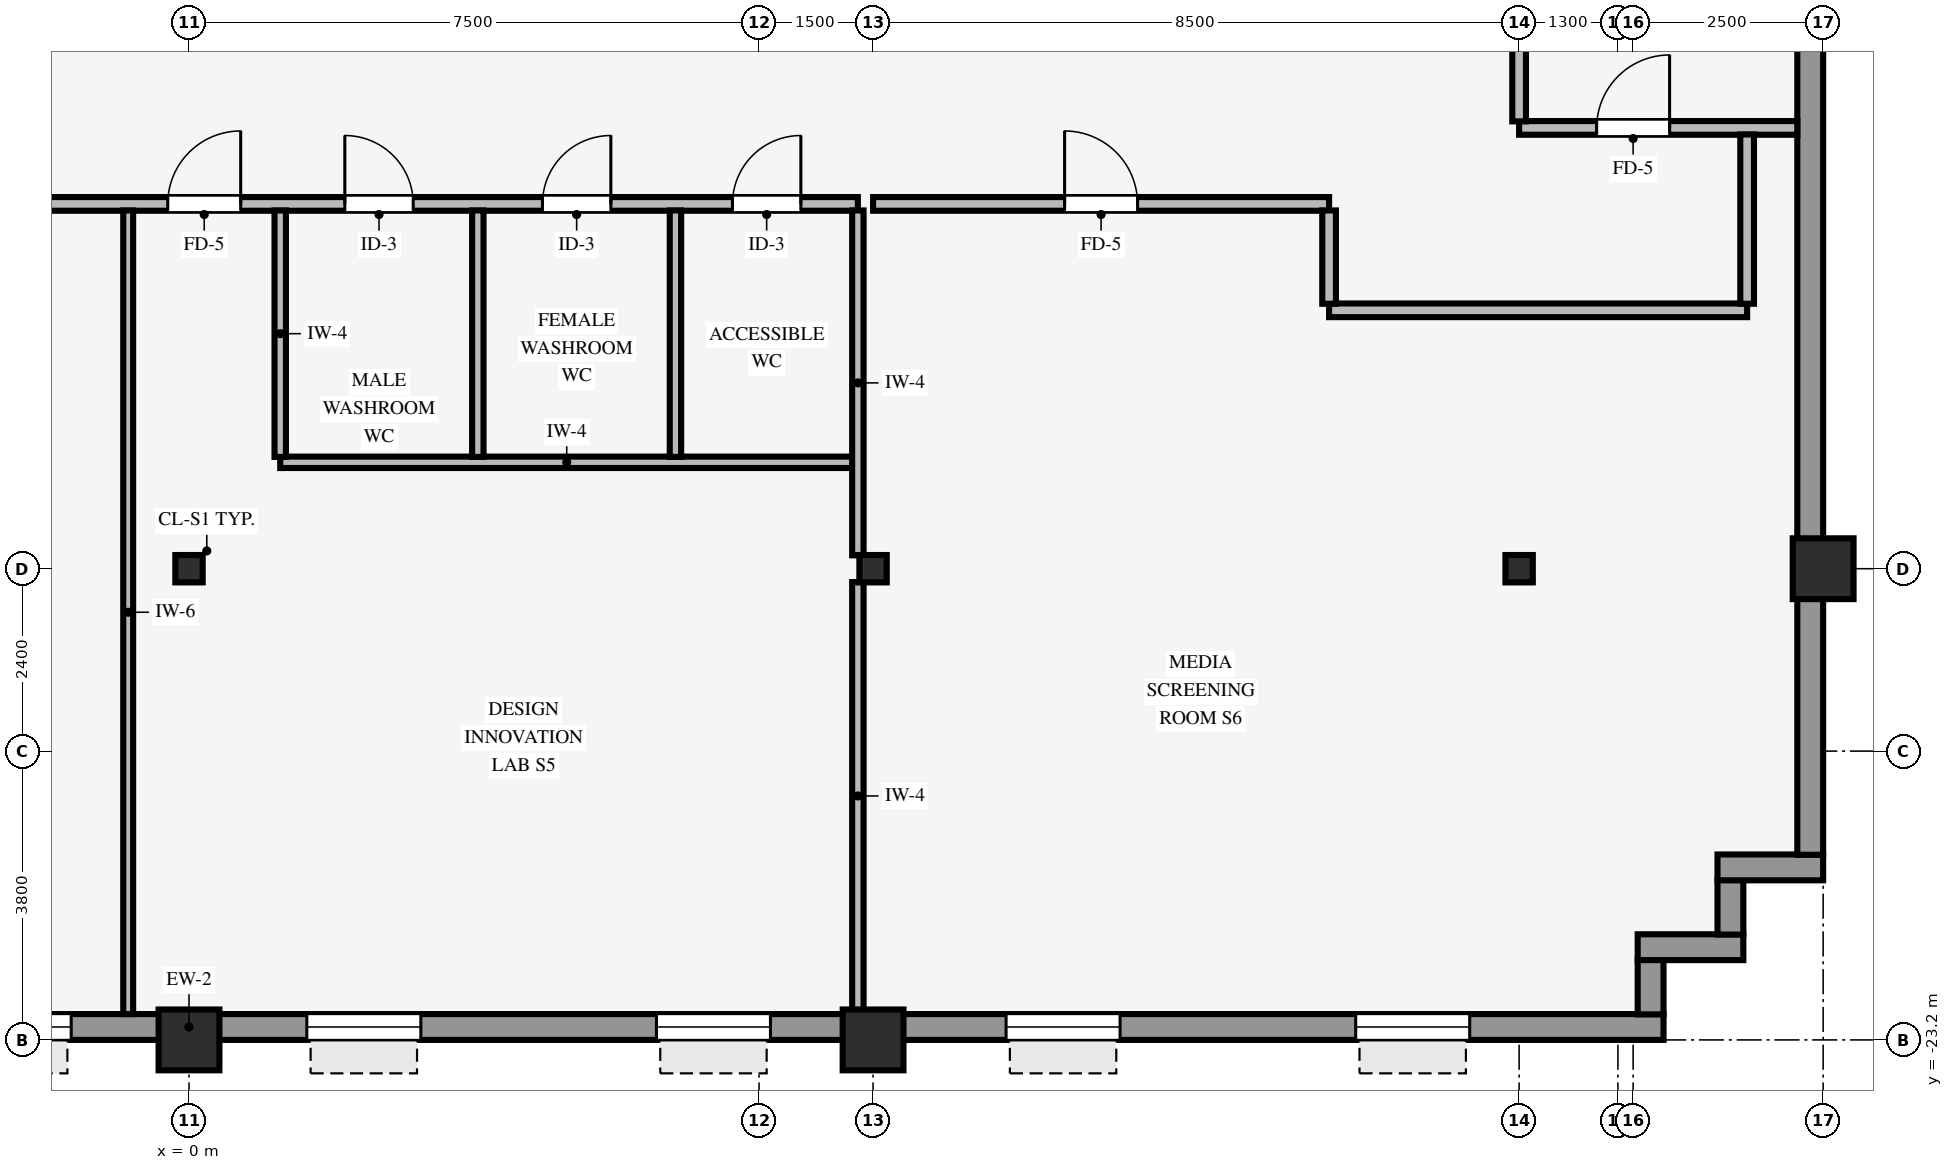
"""IFC4 building model, lengths in metres.
Left out: names, types, materials, properties, quantities, classifications, styles, units other than length and angle.
Written with IfcOpenShell. Run it as: python <this file> out.ifc"""

import sys

from ifc_helpers import new_model, si_unit, direction, frame, frame_2d, origin, origin_2d, place, context, subcontext, project, spatial, rectangle, hollow_rectangle, i_section, extrude, source, transform, mapped, element, fill, save


model = new_model("IFC4")
c1 = context("Model", 3, precision=1e-05, world=origin(), true_north=direction((0.0, 1.0)))
c2 = subcontext(c1, "Body", "Model", "MODEL_VIEW")
j1 = project(units=[si_unit("LENGTHUNIT", "METRE"), si_unit("PLANEANGLEUNIT", "RADIAN")], contexts=[c1])
p1 = place(None, origin())
s1 = spatial("IfcSite", under=j1, at=p1, CompositionType="ELEMENT")
p2 = place(p1, origin())
s2 = spatial("IfcBuilding", under=s1, at=p2, CompositionType="ELEMENT")
p3 = place(p2, frame((0.0, 0.0, 64.1)))
s3 = spatial("IfcBuildingStorey", under=s2, at=p3, CompositionType="ELEMENT", Elevation=64.1)
for number, where, z_axis, x_axis in (
    (1, (21.5, -17.0, 0.0), (0.0, 0.0, 1.0), (1.0, 0.0, 0.0)),
    (2, (0.0, -23.2, 0.0), (0.0, 0.0, 1.0), (1.0, 0.0, 0.0)),
    (3, (9.0, -23.2, 0.0), (0.0, 0.0, 1.0), (1.0, 0.0, 0.0)),
):
    element("IfcColumn", number, at=place(p3, frame(where, z_axis=z_axis, x_axis=x_axis)), inside=s3, PredefinedType="COLUMN", context=c2, shape_type="SweptSolid", body=[
        extrude(hollow_rectangle(XDim=0.8, YDim=0.8, WallThickness=0.055, InnerFilletRadius=0.055, OuterFilletRadius=0.11, at=origin_2d()), origin(), (0.0, 0.0, 1.0), 3.37),
    ])
for number, where, z_axis, x_axis in (
    (4, (0.0, -17.0, 0.0), (0.0, 0.0, 1.0), (1.0, 0.0, 0.0)),
    (5, (9.0, -17.0, 0.0), (0.0, 0.0, 1.0), (1.0, 0.0, 0.0)),
    (6, (17.5, -17.0, 0.0), (0.0, 0.0, 1.0), (1.0, 0.0, 0.0)),
):
    element("IfcColumn", number, at=place(p3, frame(where, z_axis=z_axis, x_axis=x_axis)), inside=s3, PredefinedType="COLUMN", context=c2, shape_type="SweptSolid", body=[
        extrude(i_section(OverallWidth=0.36, OverallDepth=0.36, WebThickness=0.021, FlangeThickness=0.021, FilletRadius=0.018, at=origin_2d()), origin(), (0.0, 0.0, 1.0), 3.37),
    ])
p4 = place(p3, frame((-19.4, -23.03, 0.0), z_axis=(0.0, 0.0, 1.0), x_axis=(1.0, 0.0, 0.0)))
e7 = element("IfcWall", 7, at=p4, inside=s3, PredefinedType="STANDARD", context=c2, shape_type="SweptSolid", body=[
    extrude(rectangle(XDim=38.8, YDim=0.34, at=frame_2d((19.4, 0.0))), origin(), (0.0, 0.0, 1.0), 2.705),
])
p5 = place(p4, frame((2.55, 0.0, 0.8)))
e8 = element("IfcOpeningElement", 8, at=p5, cuts=e7, PredefinedType="OPENING", context=c2, shape_type="SweptSolid", body=[
    extrude(rectangle(XDim=1.5, YDim=1.6, at=frame_2d((0.75, 0.8))), frame((0.0, 0.18, 0.0), z_axis=(0.0, -1.0, 0.0), x_axis=(1.0, 0.0, 0.0)), (0.0, 0.0, 1.0), 0.36),
])
p6 = place(p4, frame((6.25, 0.0, 0.8)))
e9 = element("IfcOpeningElement", 9, at=p6, cuts=e7, PredefinedType="OPENING", context=c2, shape_type="SweptSolid", body=[
    extrude(rectangle(XDim=1.5, YDim=1.6, at=frame_2d((0.75, 0.8))), frame((0.0, 0.18, 0.0), z_axis=(0.0, -1.0, 0.0), x_axis=(1.0, 0.0, 0.0)), (0.0, 0.0, 1.0), 0.36),
])
p7 = place(p4, frame((12.65, 0.0, 0.8)))
e10 = element("IfcOpeningElement", 10, at=p7, cuts=e7, PredefinedType="OPENING", context=c2, shape_type="SweptSolid", body=[
    extrude(rectangle(XDim=1.5, YDim=1.6, at=frame_2d((0.75, 0.8))), frame((0.0, 0.18, 0.0), z_axis=(0.0, -1.0, 0.0), x_axis=(1.0, 0.0, 0.0)), (0.0, 0.0, 1.0), 0.36),
])
p8 = place(p4, frame((16.35, 0.0, 0.8)))
e11 = element("IfcOpeningElement", 11, at=p8, cuts=e7, PredefinedType="OPENING", context=c2, shape_type="SweptSolid", body=[
    extrude(rectangle(XDim=1.5, YDim=1.6, at=frame_2d((0.75, 0.8))), frame((0.0, 0.18, 0.0), z_axis=(0.0, -1.0, 0.0), x_axis=(1.0, 0.0, 0.0)), (0.0, 0.0, 1.0), 0.36),
])
p9 = place(p4, frame((20.95, 0.0, 0.8)))
e12 = element("IfcOpeningElement", 12, at=p9, cuts=e7, PredefinedType="OPENING", context=c2, shape_type="SweptSolid", body=[
    extrude(rectangle(XDim=1.5, YDim=1.6, at=frame_2d((0.75, 0.8))), frame((0.0, 0.18, 0.0), z_axis=(0.0, -1.0, 0.0), x_axis=(1.0, 0.0, 0.0)), (0.0, 0.0, 1.0), 0.36),
])
p10 = place(p4, frame((25.55, 0.0, 0.8)))
e13 = element("IfcOpeningElement", 13, at=p10, cuts=e7, PredefinedType="OPENING", context=c2, shape_type="SweptSolid", body=[
    extrude(rectangle(XDim=1.5, YDim=1.6, at=frame_2d((0.75, 0.8))), frame((0.0, 0.18, 0.0), z_axis=(0.0, -1.0, 0.0), x_axis=(1.0, 0.0, 0.0)), (0.0, 0.0, 1.0), 0.36),
])
p11 = place(p4, frame((30.15, 0.0, 0.8)))
e14 = element("IfcOpeningElement", 14, at=p11, cuts=e7, PredefinedType="OPENING", context=c2, shape_type="SweptSolid", body=[
    extrude(rectangle(XDim=1.5, YDim=1.6, at=frame_2d((0.75, 0.8))), frame((0.0, 0.18, 0.0), z_axis=(0.0, -1.0, 0.0), x_axis=(1.0, 0.0, 0.0)), (0.0, 0.0, 1.0), 0.36),
])
p12 = place(p4, frame((34.75, 0.0, 0.8)))
e15 = element("IfcOpeningElement", 15, at=p12, cuts=e7, PredefinedType="OPENING", context=c2, shape_type="SweptSolid", body=[
    extrude(rectangle(XDim=1.5, YDim=1.6, at=frame_2d((0.75, 0.8))), frame((0.0, 0.18, 0.0), z_axis=(0.0, -1.0, 0.0), x_axis=(1.0, 0.0, 0.0)), (0.0, 0.0, 1.0), 0.36),
])
p13 = place(p3, frame((19.23, -22.864, 0.0), z_axis=(0.0, 0.0, 1.0), x_axis=(0.0, 1.0, 0.0)))
e16 = element("IfcWall", 16, at=p13, inside=s3, PredefinedType="STANDARD", context=c2, shape_type="SweptSolid", body=[
    extrude(rectangle(XDim=0.718, YDim=0.34, at=frame_2d((0.359, 0.0))), origin(), (0.0, 0.0, 1.0), 3.36),
])
p14 = place(p3, frame((19.06, -21.98, 0.0), z_axis=(0.0, 0.0, 1.0), x_axis=(1.0, 0.0, 0.0)))
e17 = element("IfcWall", 17, at=p14, inside=s3, PredefinedType="STANDARD", context=c2, shape_type="SweptSolid", body=[
    extrude(rectangle(XDim=1.39, YDim=0.34, at=frame_2d((0.695, 0.0))), origin(), (0.0, 0.0, 1.0), 3.36),
])
p15 = place(p3, frame((20.28, -21.814, 0.0), z_axis=(0.0, 0.0, 1.0), x_axis=(0.0, 1.0, 0.0)))
e18 = element("IfcWall", 18, at=p15, inside=s3, PredefinedType="STANDARD", context=c2, shape_type="SweptSolid", body=[
    extrude(rectangle(XDim=0.718, YDim=0.34, at=frame_2d((0.359, 0.0))), origin(), (0.0, 0.0, 1.0), 3.36),
])
p16 = place(p3, frame((20.11, -20.93, 0.0), z_axis=(0.0, 0.0, 1.0), x_axis=(1.0, 0.0, 0.0)))
e19 = element("IfcWall", 19, at=p16, inside=s3, PredefinedType="STANDARD", context=c2, shape_type="SweptSolid", body=[
    extrude(rectangle(XDim=1.39, YDim=0.34, at=frame_2d((0.695, 0.0))), origin(), (0.0, 0.0, 1.0), 3.36),
])
p17 = place(p3, frame((21.33, -20.764, 0.0), z_axis=(0.0, 0.0, 1.0), x_axis=(0.0, 1.0, 0.0)))
e20 = element("IfcWall", 20, at=p17, inside=s3, PredefinedType="STANDARD", context=c2, shape_type="SweptSolid", body=[
    extrude(rectangle(XDim=41.528, YDim=0.34, at=frame_2d((20.764, 0.0))), origin(), (0.0, 0.0, 1.0), 2.705),
])
p18 = place(p17, frame((12.202, 0.0, 0.8)))
e21 = element("IfcOpeningElement", 21, at=p18, cuts=e20, PredefinedType="OPENING", context=c2, shape_type="SweptSolid", body=[
    extrude(rectangle(XDim=2.3, YDim=1.62, at=frame_2d((1.15, 0.81))), frame((0.0, 0.18, 0.0), z_axis=(0.0, -1.0, 0.0), x_axis=(1.0, 0.0, 0.0)), (0.0, 0.0, 1.0), 0.36),
])
p19 = place(p17, frame((17.144, 0.0, 0.8)))
e22 = element("IfcOpeningElement", 22, at=p19, cuts=e20, PredefinedType="OPENING", context=c2, shape_type="SweptSolid", body=[
    extrude(rectangle(XDim=2.3, YDim=1.62, at=frame_2d((1.15, 0.81))), frame((0.0, 0.18, 0.0), z_axis=(0.0, -1.0, 0.0), x_axis=(1.0, 0.0, 0.0)), (0.0, 0.0, 1.0), 0.36),
])
p20 = place(p17, frame((22.084, 0.0, 0.8)))
e23 = element("IfcOpeningElement", 23, at=p20, cuts=e20, PredefinedType="OPENING", context=c2, shape_type="SweptSolid", body=[
    extrude(rectangle(XDim=2.3, YDim=1.62, at=frame_2d((1.15, 0.81))), frame((0.0, 0.18, 0.0), z_axis=(0.0, -1.0, 0.0), x_axis=(1.0, 0.0, 0.0)), (0.0, 0.0, 1.0), 0.36),
])
p21 = place(p17, frame((27.025, 0.0, 0.8)))
e24 = element("IfcOpeningElement", 24, at=p21, cuts=e20, PredefinedType="OPENING", context=c2, shape_type="SweptSolid", body=[
    extrude(rectangle(XDim=2.3, YDim=1.62, at=frame_2d((1.15, 0.81))), frame((0.0, 0.18, 0.0), z_axis=(0.0, -1.0, 0.0), x_axis=(1.0, 0.0, 0.0)), (0.0, 0.0, 1.0), 0.36),
])
p22 = place(p3, frame((1.2, -15.6, 0.0), z_axis=(0.0, 0.0, 1.0), x_axis=(1.0, 0.0, 0.0)))
e25 = element("IfcWall", 25, at=p22, inside=s3, PredefinedType="PARTITIONING", context=c2, shape_type="SweptSolid", body=[
    extrude(rectangle(XDim=7.539, YDim=0.15, at=frame_2d((3.77, 0.0))), origin(), (0.0, 0.0, 1.0), 3.36),
])
p23 = place(p3, frame((15.0, -13.6, 0.0), z_axis=(0.0, 0.0, 1.0), x_axis=(1.0, 0.0, 0.0)))
e26 = element("IfcWall", 26, at=p23, inside=s3, PredefinedType="PARTITIONING", context=c2, shape_type="SweptSolid", body=[
    extrude(rectangle(XDim=5.5, YDim=0.18, at=frame_2d((2.75, 0.0))), origin(), (0.0, 0.0, 1.0), 2.942),
])
p24 = place(p3, frame((-15.0, -12.2, 0.0), z_axis=(0.0, 0.0, 1.0), x_axis=(1.0, 0.0, 0.0)))
e27 = element("IfcWall", 27, at=p24, inside=s3, PredefinedType="PARTITIONING", context=c2, shape_type="SweptSolid", body=[
    extrude(rectangle(XDim=23.8, YDim=0.18, at=frame_2d((11.9, 0.0))), origin(), (0.0, 0.0, 1.0), 3.36),
])
p25 = place(p24, frame((9.31, 0.0, 0.0)))
e28 = element("IfcOpeningElement", 28, at=p25, cuts=e27, PredefinedType="OPENING", context=c2, shape_type="SweptSolid", body=[
    extrude(rectangle(XDim=0.96, YDim=2.1, at=frame_2d((0.48, 1.05))), frame((0.0, 0.1, 0.0), z_axis=(0.0, -1.0, 0.0), x_axis=(1.0, 0.0, 0.0)), (0.0, 0.0, 1.0), 0.2),
])
p26 = place(p24, frame((1.715, 0.0, 0.0)))
e29 = element("IfcOpeningElement", 29, at=p26, cuts=e27, PredefinedType="OPENING", context=c2, shape_type="SweptSolid", body=[
    extrude(rectangle(XDim=0.96, YDim=2.1, at=frame_2d((0.48, 1.05))), frame((0.0, 0.1, 0.0), z_axis=(0.0, -1.0, 0.0), x_axis=(1.0, 0.0, 0.0)), (0.0, 0.0, 1.0), 0.2),
])
p27 = place(p24, frame((5.44, 0.0, 0.0)))
e30 = element("IfcOpeningElement", 30, at=p27, cuts=e27, PredefinedType="OPENING", context=c2, shape_type="SweptSolid", body=[
    extrude(rectangle(XDim=0.96, YDim=2.1, at=frame_2d((0.48, 1.05))), frame((0.0, 0.1, 0.0), z_axis=(0.0, -1.0, 0.0), x_axis=(1.0, 0.0, 0.0)), (0.0, 0.0, 1.0), 0.2),
])
p28 = place(p24, frame((19.65, 0.0, 0.0)))
e31 = element("IfcOpeningElement", 31, at=p28, cuts=e27, PredefinedType="OPENING", context=c2, shape_type="SweptSolid", body=[
    extrude(rectangle(XDim=0.9, YDim=2.1, at=frame_2d((0.45, 1.05))), frame((0.0, 0.1, 0.0), z_axis=(0.0, -1.0, 0.0), x_axis=(1.0, 0.0, 0.0)), (0.0, 0.0, 1.0), 0.2),
])
p29 = place(p24, frame((17.05, 0.0, 0.0)))
e32 = element("IfcOpeningElement", 32, at=p29, cuts=e27, PredefinedType="OPENING", context=c2, shape_type="SweptSolid", body=[
    extrude(rectangle(XDim=0.9, YDim=2.1, at=frame_2d((0.45, 1.05))), frame((0.0, 0.1, 0.0), z_axis=(0.0, -1.0, 0.0), x_axis=(1.0, 0.0, 0.0)), (0.0, 0.0, 1.0), 0.2),
])
p30 = place(p24, frame((22.15, 0.0, 0.0)))
e33 = element("IfcOpeningElement", 33, at=p30, cuts=e27, PredefinedType="OPENING", context=c2, shape_type="SweptSolid", body=[
    extrude(rectangle(XDim=0.9, YDim=2.1, at=frame_2d((0.45, 1.05))), frame((0.0, 0.1, 0.0), z_axis=(0.0, -1.0, 0.0), x_axis=(1.0, 0.0, 0.0)), (0.0, 0.0, 1.0), 0.2),
])
p31 = place(p24, frame((14.72, 0.0, 0.0)))
e34 = element("IfcOpeningElement", 34, at=p31, cuts=e27, PredefinedType="OPENING", context=c2, shape_type="SweptSolid", body=[
    extrude(rectangle(XDim=0.96, YDim=2.1, at=frame_2d((0.48, 1.05))), frame((0.0, 0.1, 0.0), z_axis=(0.0, -1.0, 0.0), x_axis=(1.0, 0.0, 0.0)), (0.0, 0.0, 1.0), 0.2),
])
p32 = place(p3, frame((9.0, -12.2, 0.0), z_axis=(0.0, 0.0, 1.0), x_axis=(1.0, 0.0, 0.0)))
e35 = element("IfcWall", 35, at=p32, inside=s3, PredefinedType="PARTITIONING", context=c2, shape_type="SweptSolid", body=[
    extrude(rectangle(XDim=6.0, YDim=0.18, at=frame_2d((3.0, 0.0))), origin(), (0.0, 0.0, 1.0), 3.36),
])
p33 = place(p32, frame((2.52, 0.0, 0.0)))
e36 = element("IfcOpeningElement", 36, at=p33, cuts=e35, PredefinedType="OPENING", context=c2, shape_type="SweptSolid", body=[
    extrude(rectangle(XDim=0.96, YDim=2.1, at=frame_2d((0.48, 1.05))), frame((0.0, 0.1, 0.0), z_axis=(0.0, -1.0, 0.0), x_axis=(1.0, 0.0, 0.0)), (0.0, 0.0, 1.0), 0.2),
])
p34 = place(p3, frame((17.5, -11.2, 0.0), z_axis=(0.0, 0.0, 1.0), x_axis=(1.0, 0.0, 0.0)))
e37 = element("IfcWall", 37, at=p34, inside=s3, PredefinedType="PARTITIONING", context=c2, shape_type="SweptSolid", body=[
    extrude(rectangle(XDim=3.66, YDim=0.18, at=frame_2d((1.83, 0.0))), origin(), (0.0, 0.0, 1.0), 3.36),
])
p35 = place(p34, frame((1.02, 0.0, 0.0)))
e38 = element("IfcOpeningElement", 38, at=p35, cuts=e37, PredefinedType="OPENING", context=c2, shape_type="SweptSolid", body=[
    extrude(rectangle(XDim=0.96, YDim=2.1, at=frame_2d((0.48, 1.05))), frame((0.0, 0.1, 0.0), z_axis=(0.0, -1.0, 0.0), x_axis=(1.0, 0.0, 0.0)), (0.0, 0.0, 1.0), 0.2),
])
p36 = place(p3, frame((-0.8, -22.86, 0.0), z_axis=(0.0, 0.0, 1.0), x_axis=(0.0, 1.0, 0.0)))
e39 = element("IfcWall", 39, at=p36, inside=s3, PredefinedType="PARTITIONING", context=c2, shape_type="SweptSolid", body=[
    extrude(rectangle(XDim=10.574, YDim=0.13, at=frame_2d((5.287, 0.0))), origin(), (0.0, 0.0, 1.0), 3.36),
])
for number, where, z_axis, x_axis in (
    (40, (1.2, -15.529, 0.0), (0.0, 0.0, 1.0), (0.0, 1.0, 0.0)),
    (41, (3.8, -15.529, 0.0), (0.0, 0.0, 1.0), (0.0, 1.0, 0.0)),
    (42, (6.4, -15.529, 0.0), (0.0, 0.0, 1.0), (0.0, 1.0, 0.0)),
):
    element("IfcWall", number, at=place(p3, frame(where, z_axis=z_axis, x_axis=x_axis)), inside=s3, PredefinedType="PARTITIONING", context=c2, shape_type="SweptSolid", body=[
        extrude(rectangle(XDim=3.243, YDim=0.15, at=frame_2d((1.622, 0.0))), origin(), (0.0, 0.0, 1.0), 3.36),
    ])
p37 = place(p3, frame((8.8, -22.804, 0.0), z_axis=(0.0, 0.0, 1.0), x_axis=(0.0, 1.0, 0.0)))
e43 = element("IfcWall", 43, at=p37, inside=s3, PredefinedType="PARTITIONING", context=c2, shape_type="SweptSolid", body=[
    extrude(rectangle(XDim=5.628, YDim=0.15, at=frame_2d((2.814, 0.0))), origin(), (0.0, 0.0, 1.0), 2.738),
])
p38 = place(p3, frame((8.8, -16.824, 0.0), z_axis=(0.0, 0.0, 1.0), x_axis=(0.0, 1.0, 0.0)))
e44 = element("IfcWall", 44, at=p38, inside=s3, PredefinedType="PARTITIONING", context=c2, shape_type="SweptSolid", body=[
    extrude(rectangle(XDim=4.538, YDim=0.15, at=frame_2d((2.269, 0.0))), origin(), (0.0, 0.0, 1.0), 2.738),
])
p39 = place(p3, frame((15.0, -13.514, 0.0), z_axis=(0.0, 0.0, 1.0), x_axis=(0.0, 1.0, 0.0)))
e45 = element("IfcWall", 45, at=p39, inside=s3, PredefinedType="PARTITIONING", context=c2, shape_type="SweptSolid", body=[
    extrude(rectangle(XDim=1.228, YDim=0.18, at=frame_2d((0.614, 0.0))), origin(), (0.0, 0.0, 1.0), 3.36),
])
p40 = place(p3, frame((17.5, -11.114, 0.0), z_axis=(0.0, 0.0, 1.0), x_axis=(0.0, 1.0, 0.0)))
e46 = element("IfcWall", 46, at=p40, inside=s3, PredefinedType="PARTITIONING", context=c2, shape_type="SweptSolid", body=[
    extrude(rectangle(XDim=0.968, YDim=0.18, at=frame_2d((0.484, 0.0))), origin(), (0.0, 0.0, 1.0), 2.738),
])
p41 = place(p3, frame((20.5, -13.514, 0.0), z_axis=(0.0, 0.0, 1.0), x_axis=(0.0, 1.0, 0.0)))
e47 = element("IfcWall", 47, at=p41, inside=s3, PredefinedType="PARTITIONING", context=c2, shape_type="SweptSolid", body=[
    extrude(rectangle(XDim=2.228, YDim=0.18, at=frame_2d((1.114, 0.0))), origin(), (0.0, 0.0, 1.0), 3.36),
])
m1 = source(origin(), c2, "Body", "SweptSolid", [
    extrude(rectangle(XDim=1.5, YDim=1.6, at=frame_2d((0.75, 0.8))), frame((0.0, 0.03, 0.0), z_axis=(0.0, -1.0, 0.0), x_axis=(1.0, 0.0, 0.0)), (0.0, 0.0, 1.0), 0.06),
])
p42 = place(p8, origin())
e48 = element("IfcWindow", 48, at=p42, inside=s3, PartitioningType="SINGLE_PANEL", PredefinedType="WINDOW", context=c2, shape_type="MappedRepresentation", body=[
    mapped(m1, transform((0.0, 0.0, 0.0), scale=1.0)),
])
fill(e11, e48)
p43 = place(p9, origin())
e49 = element("IfcWindow", 49, at=p43, inside=s3, PartitioningType="SINGLE_PANEL", PredefinedType="WINDOW", context=c2, shape_type="MappedRepresentation", body=[
    mapped(m1, transform((0.0, 0.0, 0.0), scale=1.0)),
])
fill(e12, e49)
p44 = place(p10, origin())
e50 = element("IfcWindow", 50, at=p44, inside=s3, PartitioningType="SINGLE_PANEL", PredefinedType="WINDOW", context=c2, shape_type="MappedRepresentation", body=[
    mapped(m1, transform((0.0, 0.0, 0.0), scale=1.0)),
])
fill(e13, e50)
p45 = place(p11, origin())
e51 = element("IfcWindow", 51, at=p45, inside=s3, PartitioningType="SINGLE_PANEL", PredefinedType="WINDOW", context=c2, shape_type="MappedRepresentation", body=[
    mapped(m1, transform((0.0, 0.0, 0.0), scale=1.0)),
])
fill(e14, e51)
p46 = place(p12, origin())
e52 = element("IfcWindow", 52, at=p46, inside=s3, PartitioningType="SINGLE_PANEL", PredefinedType="WINDOW", context=c2, shape_type="MappedRepresentation", body=[
    mapped(m1, transform((0.0, 0.0, 0.0), scale=1.0)),
])
fill(e15, e52)
m2 = source(origin(), c2, "Body", "SweptSolid", [
    extrude(rectangle(XDim=0.96, YDim=2.1, at=frame_2d((0.48, 1.05))), frame((0.0, 0.025, 0.0), z_axis=(0.0, -1.0, 0.0), x_axis=(1.0, 0.0, 0.0)), (0.0, 0.0, 1.0), 0.05),
])
p47 = place(p33, origin())
e53 = element("IfcDoor", 53, at=p47, inside=s3, OperationType="SINGLE_SWING_LEFT", PredefinedType="DOOR", context=c2, shape_type="MappedRepresentation", body=[
    mapped(m2, transform((0.0, 0.0, 0.0), scale=1.0)),
])
fill(e36, e53)
p48 = place(p35, origin())
e54 = element("IfcDoor", 54, at=p48, inside=s3, OperationType="SINGLE_SWING_RIGHT", PredefinedType="DOOR", context=c2, shape_type="MappedRepresentation", body=[
    mapped(m2, transform((0.0, 0.0, 0.0), scale=1.0)),
])
fill(e38, e54)
m3 = source(origin(), c2, "Body", "SweptSolid", [
    extrude(rectangle(XDim=0.9, YDim=2.1, at=frame_2d((0.45, 1.05))), frame((0.0, 0.025, 0.0), z_axis=(0.0, -1.0, 0.0), x_axis=(1.0, 0.0, 0.0)), (0.0, 0.0, 1.0), 0.05),
])
p49 = place(p28, origin())
e55 = element("IfcDoor", 55, at=p49, inside=s3, OperationType="SINGLE_SWING_RIGHT", PredefinedType="DOOR", context=c2, shape_type="MappedRepresentation", body=[
    mapped(m3, transform((0.0, 0.0, 0.0), scale=1.0)),
])
fill(e31, e55)
p50 = place(p29, origin())
e56 = element("IfcDoor", 56, at=p50, inside=s3, OperationType="SINGLE_SWING_LEFT", PredefinedType="DOOR", context=c2, shape_type="MappedRepresentation", body=[
    mapped(m3, transform((0.0, 0.0, 0.0), scale=1.0)),
])
fill(e32, e56)
p51 = place(p30, origin())
e57 = element("IfcDoor", 57, at=p51, inside=s3, OperationType="SINGLE_SWING_RIGHT", PredefinedType="DOOR", context=c2, shape_type="MappedRepresentation", body=[
    mapped(m3, transform((0.0, 0.0, 0.0), scale=1.0)),
])
fill(e33, e57)
p52 = place(p31, origin())
e58 = element("IfcDoor", 58, at=p52, inside=s3, OperationType="SINGLE_SWING_RIGHT", PredefinedType="DOOR", context=c2, shape_type="MappedRepresentation", body=[
    mapped(m2, transform((0.0, 0.0, 0.0), scale=1.0)),
])
fill(e34, e58)
save(model, sys.argv[1])
